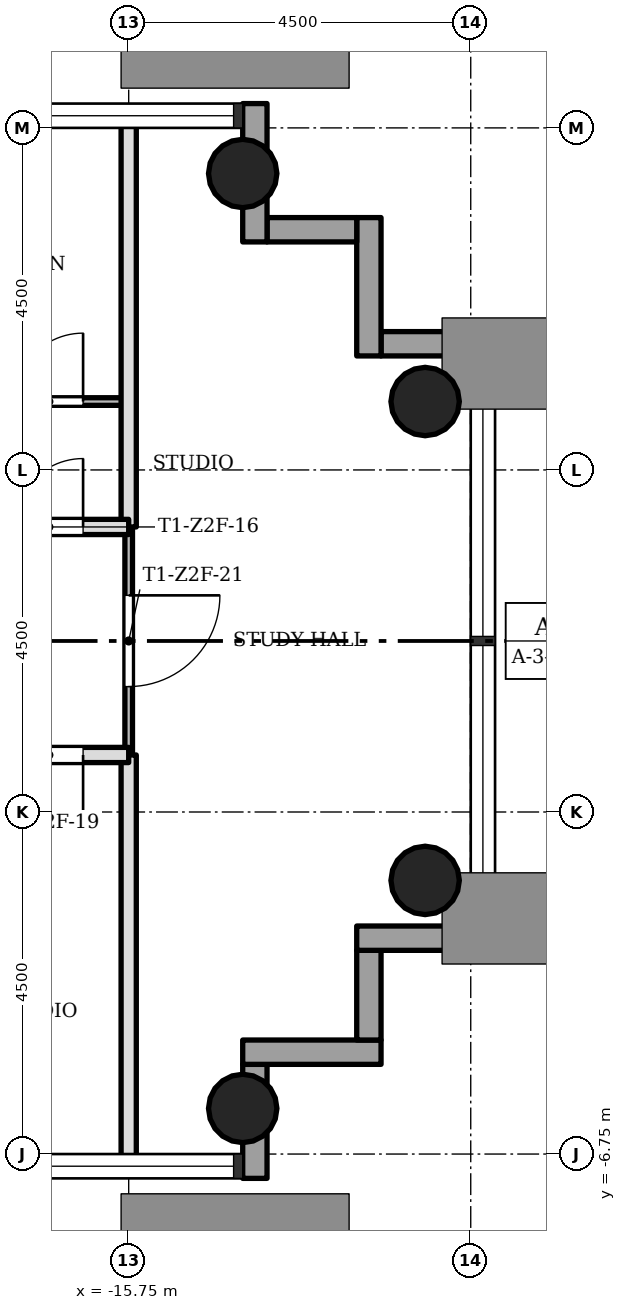
"""IFC4 building model, lengths in metres.
Left out: names, types, materials, properties, quantities, classifications, styles, units other than length and angle.
Written with IfcOpenShell. Run it as: python <this file> out.ifc"""

import sys

from ifc_helpers import new_model, si_unit, direction, frame, frame_2d, origin, origin_2d, place, context, subcontext, project, spatial, rectangle, hollow_circle, extrude, element, fill, save


model = new_model("IFC4")
c1 = context("Model", 3, precision=1e-05, world=origin(), true_north=direction((0.0, 1.0)))
c2 = subcontext(c1, "Body", "Model", "MODEL_VIEW")
j1 = project(units=[si_unit("LENGTHUNIT", "METRE"), si_unit("PLANEANGLEUNIT", "RADIAN")], contexts=[c1])
p1 = place(None, origin())
s1 = spatial("IfcSite", under=j1, at=p1, CompositionType="ELEMENT")
p2 = place(p1, origin())
s2 = spatial("IfcBuilding", under=s1, at=p2, CompositionType="ELEMENT")
p3 = place(p2, frame((0.0, 0.0, 107.2)))
s3 = spatial("IfcBuildingStorey", under=s2, at=p3, CompositionType="ELEMENT", Elevation=107.2)
for number, where, z_axis, x_axis in (
    (1, (-14.25, -6.15, 0.0), (0.0, 0.0, 1.0), (1.0, 0.0, 0.0)),
    (2, (-14.25, 6.15, 0.0), (0.0, 0.0, 1.0), (1.0, 0.0, 0.0)),
    (3, (-11.85, -3.15, 0.0), (0.0, 0.0, 1.0), (1.0, 0.0, 0.0)),
    (4, (-11.85, 3.15, 0.0), (0.0, 0.0, 1.0), (1.0, 0.0, 0.0)),
):
    element("IfcColumn", number, at=place(p3, frame(where, z_axis=z_axis, x_axis=x_axis)), inside=s3, PredefinedType="COLUMN", context=c2, shape_type="SweptSolid", body=[
        extrude(hollow_circle(Radius=0.45, WallThickness=0.032, at=origin_2d()), origin(), (0.0, 0.0, 1.0), 3.4),
    ])
p4 = place(p3, frame((-14.09, -7.07, -0.3), z_axis=(0.0, 0.0, 1.0), x_axis=(0.0, 1.0, 0.0)))
e5 = element("IfcWall", 5, at=p4, inside=s3, PredefinedType="STANDARD", context=c2, shape_type="SweptSolid", body=[
    extrude(rectangle(XDim=1.5, YDim=0.32, at=frame_2d((0.75, 0.0))), origin(), (0.0, 0.0, 1.0), 3.4),
])
p5 = place(p3, frame((-14.25, -5.41, -0.3), z_axis=(0.0, 0.0, 1.0), x_axis=(1.0, 0.0, 0.0)))
e6 = element("IfcWall", 6, at=p5, inside=s3, PredefinedType="STANDARD", context=c2, shape_type="SweptSolid", body=[
    extrude(rectangle(XDim=1.82, YDim=0.32, at=frame_2d((0.91, 0.0))), origin(), (0.0, 0.0, 1.0), 3.4),
])
p6 = place(p3, frame((-12.59, -5.25, -0.3), z_axis=(0.0, 0.0, 1.0), x_axis=(0.0, 1.0, 0.0)))
e7 = element("IfcWall", 7, at=p6, inside=s3, PredefinedType="STANDARD", context=c2, shape_type="SweptSolid", body=[
    extrude(rectangle(XDim=1.18, YDim=0.32, at=frame_2d((0.59, 0.0))), origin(), (0.0, 0.0, 1.0), 3.4),
])
p7 = place(p3, frame((-12.75, -3.91, -0.3), z_axis=(0.0, 0.0, 1.0), x_axis=(1.0, 0.0, 0.0)))
e8 = element("IfcWall", 8, at=p7, inside=s3, PredefinedType="STANDARD", context=c2, shape_type="SweptSolid", body=[
    extrude(rectangle(XDim=1.82, YDim=0.32, at=frame_2d((0.91, 0.0))), origin(), (0.0, 0.0, 1.0), 3.4),
])
p8 = place(p3, frame((-10.93, 3.91, -0.3), z_axis=(0.0, 0.0, 1.0), x_axis=(-1.0, 0.0, 0.0)))
e9 = element("IfcWall", 9, at=p8, inside=s3, PredefinedType="STANDARD", context=c2, shape_type="SweptSolid", body=[
    extrude(rectangle(XDim=1.5, YDim=0.32, at=frame_2d((0.75, 0.0))), origin(), (0.0, 0.0, 1.0), 3.4),
])
p9 = place(p3, frame((-12.59, 3.75, -0.3), z_axis=(0.0, 0.0, 1.0), x_axis=(0.0, 1.0, 0.0)))
e10 = element("IfcWall", 10, at=p9, inside=s3, PredefinedType="STANDARD", context=c2, shape_type="SweptSolid", body=[
    extrude(rectangle(XDim=1.82, YDim=0.32, at=frame_2d((0.91, 0.0))), origin(), (0.0, 0.0, 1.0), 3.4),
])
p10 = place(p3, frame((-12.75, 5.41, -0.3), z_axis=(0.0, 0.0, 1.0), x_axis=(-1.0, 0.0, 0.0)))
e11 = element("IfcWall", 11, at=p10, inside=s3, PredefinedType="STANDARD", context=c2, shape_type="SweptSolid", body=[
    extrude(rectangle(XDim=1.18, YDim=0.32, at=frame_2d((0.59, 0.0))), origin(), (0.0, 0.0, 1.0), 3.4),
])
p11 = place(p3, frame((-14.09, 5.25, -0.3), z_axis=(0.0, 0.0, 1.0), x_axis=(0.0, 1.0, 0.0)))
e12 = element("IfcWall", 12, at=p11, inside=s3, PredefinedType="STANDARD", context=c2, shape_type="SweptSolid", body=[
    extrude(rectangle(XDim=1.82, YDim=0.32, at=frame_2d((0.91, 0.0))), origin(), (0.0, 0.0, 1.0), 3.4),
])
p12 = place(p3, frame((-15.75, -1.5, 0.0), z_axis=(0.0, 0.0, 1.0), x_axis=(0.0, 1.0, 0.0)))
e13 = element("IfcWall", 13, at=p12, inside=s3, PredefinedType="PARTITIONING", context=c2, shape_type="SweptSolid", body=[
    extrude(rectangle(XDim=3.0, YDim=0.1, at=frame_2d((1.5, 0.0))), origin(), (0.0, 0.0, 1.0), 3.0),
])
p13 = place(p12, frame((0.9, 0.0, 0.0)))
e14 = element("IfcOpeningElement", 14, at=p13, cuts=e13, PredefinedType="OPENING", context=c2, shape_type="SweptSolid", body=[
    extrude(rectangle(XDim=1.2, YDim=2.1, at=frame_2d((0.6, 1.05))), frame((0.0, 0.06, 0.0), z_axis=(0.0, -1.0, 0.0), x_axis=(1.0, 0.0, 0.0)), (0.0, 0.0, 1.0), 0.12),
])
for number, where, z_axis, x_axis in (
    (15, (-15.75, -6.85, 0.0), (0.0, 0.0, 1.0), (0.0, 1.0, 0.0)),
    (16, (-15.75, 1.5, 0.0), (0.0, 0.0, 1.0), (0.0, 1.0, 0.0)),
):
    element("IfcWall", number, at=place(p3, frame(where, z_axis=z_axis, x_axis=x_axis)), inside=s3, PredefinedType="SOLIDWALL", context=c2, shape_type="SweptSolid", body=[
        extrude(rectangle(XDim=5.35, YDim=0.2, at=frame_2d((2.675, 0.0))), origin(), (0.0, 0.0, 1.0), 3.0),
    ])
p14 = place(p3, frame((-20.25, -1.5, 0.0), z_axis=(0.0, 0.0, 1.0), x_axis=(1.0, 0.0, 0.0)))
e17 = element("IfcWall", 17, at=p14, inside=s3, PredefinedType="SOLIDWALL", context=c2, shape_type="SweptSolid", body=[
    extrude(rectangle(XDim=4.5, YDim=0.2, at=frame_2d((2.25, 0.0))), origin(), (0.0, 0.0, 1.0), 3.0),
])
p15 = place(p14, frame((3.0, 0.0, 0.0)))
e18 = element("IfcOpeningElement", 18, at=p15, cuts=e17, PredefinedType="OPENING", context=c2, shape_type="SweptSolid", body=[
    extrude(rectangle(XDim=0.9, YDim=2.1, at=frame_2d((0.45, 1.05))), frame((0.0, 0.11, 0.0), z_axis=(0.0, -1.0, 0.0), x_axis=(1.0, 0.0, 0.0)), (0.0, 0.0, 1.0), 0.22),
])
p16 = place(p3, frame((-20.25, 1.5, 0.0), z_axis=(0.0, 0.0, 1.0), x_axis=(1.0, 0.0, 0.0)))
e19 = element("IfcWall", 19, at=p16, inside=s3, PredefinedType="SOLIDWALL", context=c2, shape_type="SweptSolid", body=[
    extrude(rectangle(XDim=4.5, YDim=0.2, at=frame_2d((2.25, 0.0))), origin(), (0.0, 0.0, 1.0), 3.0),
])
p17 = place(p16, frame((3.0, 0.0, 0.0)))
e20 = element("IfcOpeningElement", 20, at=p17, cuts=e19, PredefinedType="OPENING", context=c2, shape_type="SweptSolid", body=[
    extrude(rectangle(XDim=0.9, YDim=2.1, at=frame_2d((0.45, 1.05))), frame((0.0, 0.11, 0.0), z_axis=(0.0, -1.0, 0.0), x_axis=(1.0, 0.0, 0.0)), (0.0, 0.0, 1.0), 0.22),
])
p18 = place(p3, frame((-20.25, 3.15, 0.0), z_axis=(0.0, 0.0, 1.0), x_axis=(1.0, 0.0, 0.0)))
e21 = element("IfcWall", 21, at=p18, inside=s3, PredefinedType="PARTITIONING", context=c2, shape_type="SweptSolid", body=[
    extrude(rectangle(XDim=4.5, YDim=0.1, at=frame_2d((2.25, 0.0))), origin(), (0.0, 0.0, 1.0), 3.0),
])
p19 = place(p18, frame((3.0, 0.0, 0.0)))
e22 = element("IfcOpeningElement", 22, at=p19, cuts=e21, PredefinedType="OPENING", context=c2, shape_type="SweptSolid", body=[
    extrude(rectangle(XDim=0.9, YDim=2.1, at=frame_2d((0.45, 1.05))), frame((0.0, 0.06, 0.0), z_axis=(0.0, -1.0, 0.0), x_axis=(1.0, 0.0, 0.0)), (0.0, 0.0, 1.0), 0.12),
])
p20 = place(p17, origin())
e23 = element("IfcDoor", 23, at=p20, inside=s3, OperationType="SINGLE_SWING_LEFT", PredefinedType="DOOR", context=c2, shape_type="SweptSolid", body=[
    extrude(rectangle(XDim=0.9, YDim=2.1, at=frame_2d((0.45, 1.05))), frame((0.0, 0.025, 0.0), z_axis=(0.0, -1.0, 0.0), x_axis=(1.0, 0.0, 0.0)), (0.0, 0.0, 1.0), 0.05),
])
fill(e20, e23)
p21 = place(p19, origin())
e24 = element("IfcDoor", 24, at=p21, inside=s3, OperationType="SINGLE_SWING_LEFT", PredefinedType="DOOR", context=c2, shape_type="SweptSolid", body=[
    extrude(rectangle(XDim=0.9, YDim=2.1, at=frame_2d((0.45, 1.05))), frame((0.0, 0.025, 0.0), z_axis=(0.0, -1.0, 0.0), x_axis=(1.0, 0.0, 0.0)), (0.0, 0.0, 1.0), 0.05),
])
fill(e22, e24)
p22 = place(p15, origin())
e25 = element("IfcDoor", 25, at=p22, inside=s3, OperationType="SINGLE_SWING_RIGHT", PredefinedType="DOOR", context=c2, shape_type="SweptSolid", body=[
    extrude(rectangle(XDim=0.9, YDim=2.1, at=frame_2d((0.45, 1.05))), frame((0.0, 0.025, 0.0), z_axis=(0.0, -1.0, 0.0), x_axis=(1.0, 0.0, 0.0)), (0.0, 0.0, 1.0), 0.05),
])
fill(e18, e25)
p23 = place(p13, origin())
e26 = element("IfcDoor", 26, at=p23, inside=s3, OperationType="SINGLE_SWING_RIGHT", PredefinedType="DOOR", context=c2, shape_type="SweptSolid", body=[
    extrude(rectangle(XDim=1.2, YDim=2.1, at=frame_2d((0.6, 1.05))), frame((0.0, 0.025, 0.0), z_axis=(0.0, -1.0, 0.0), x_axis=(1.0, 0.0, 0.0)), (0.0, 0.0, 1.0), 0.05),
])
fill(e14, e26)
save(model, sys.argv[1])
